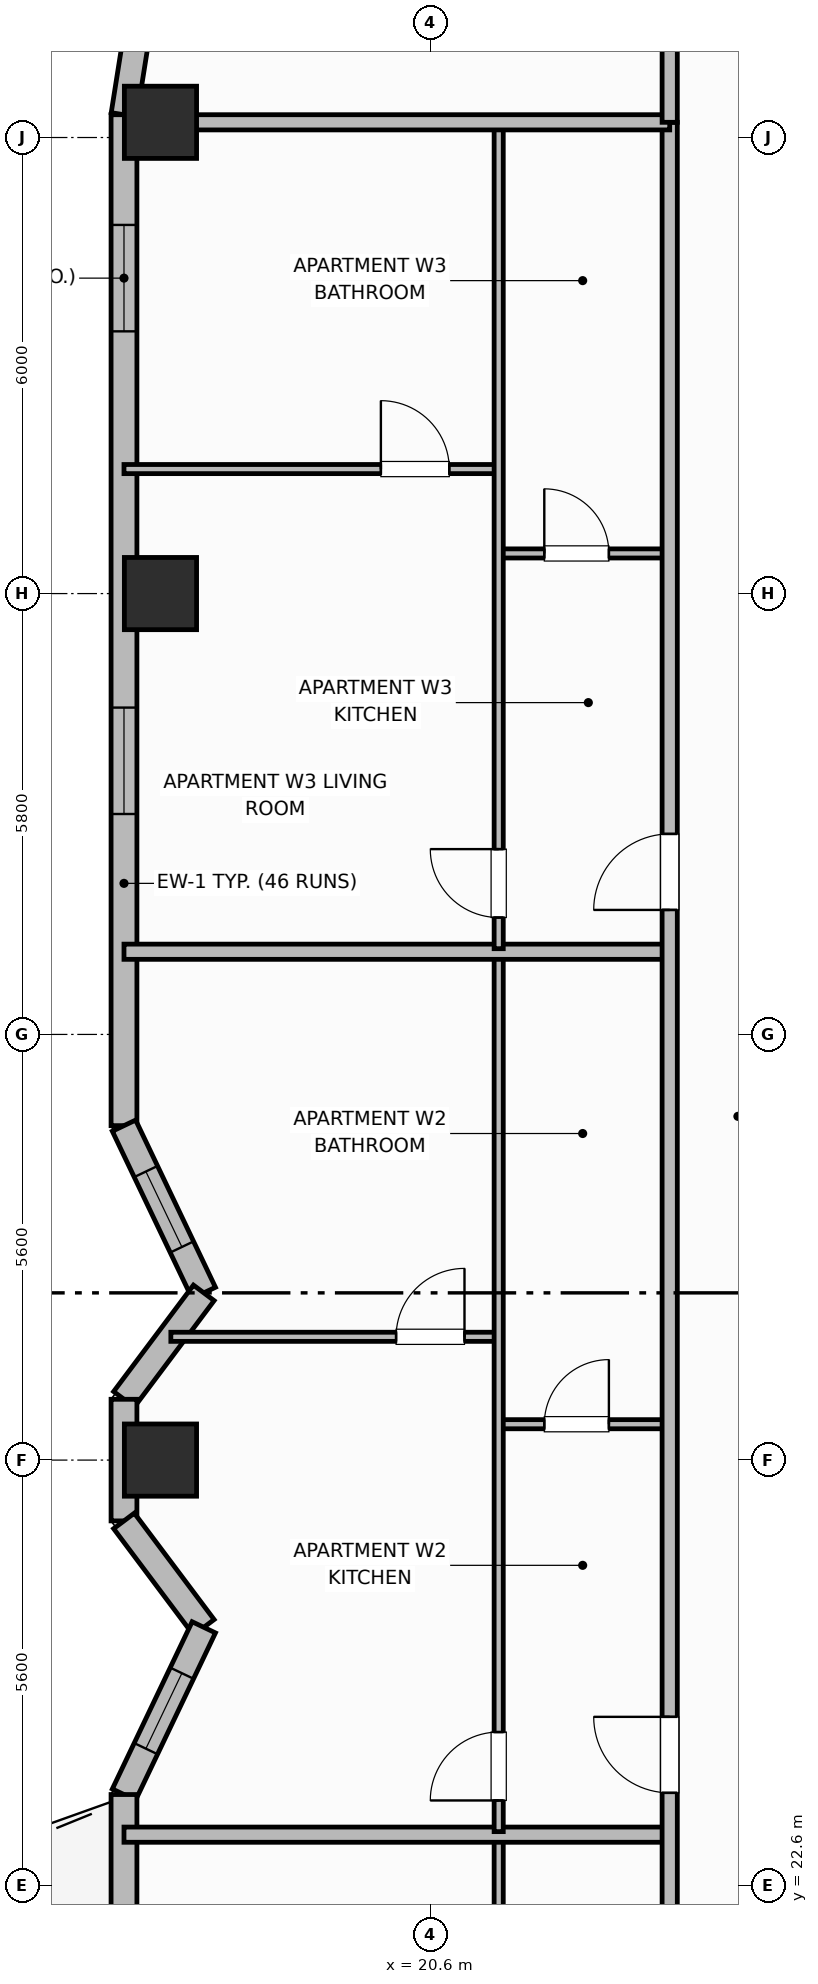
"""IFC4 building model, lengths in metres.
Left out: names, types, materials, properties, quantities, classifications, styles, units other than length and angle.
Written with IfcOpenShell. Run it as: python <this file> out.ifc"""

import sys

from ifc_helpers import new_model, si_unit, direction, frame, frame_2d, origin, origin_2d, place, context, subcontext, project, spatial, rectangle, extrude, element, fill, save


model = new_model("IFC4")
c1 = context("Model", 3, precision=1e-05, world=origin(), true_north=direction((0.0, 1.0)))
c2 = subcontext(c1, "Body", "Model", "MODEL_VIEW")
j1 = project(units=[si_unit("LENGTHUNIT", "METRE"), si_unit("PLANEANGLEUNIT", "RADIAN")], contexts=[c1])
p1 = place(None, origin())
s1 = spatial("IfcSite", under=j1, at=p1, CompositionType="ELEMENT")
p2 = place(p1, origin())
s2 = spatial("IfcBuilding", under=s1, at=p2, CompositionType="ELEMENT")
p3 = place(p2, frame((0.0, 0.0, 192.2)))
s3 = spatial("IfcBuildingStorey", under=s2, at=p3, CompositionType="ELEMENT", Elevation=192.2)
for number, where, z_axis, x_axis in (
    (1, (17.05, 28.2, 0.0), (0.0, 0.0, 1.0), (1.0, 0.0, 0.0)),
    (2, (17.05, 39.6, 0.0), (0.0, 0.0, 1.0), (1.0, 0.0, 0.0)),
    (3, (17.05, 45.8, 0.0), (0.0, 0.0, 1.0), (1.0, 0.0, 0.0)),
):
    element("IfcColumn", number, at=place(p3, frame(where, z_axis=z_axis, x_axis=x_axis)), inside=s3, PredefinedType="COLUMN", context=c2, shape_type="SweptSolid", body=[
        extrude(rectangle(XDim=0.95, YDim=0.95, at=origin_2d()), origin(), (0.0, 0.0, 1.0), 3.7),
    ])
p4 = place(p3, frame((16.748, 47.022, 0.0), z_axis=(0.0, 0.0, 1.0), x_axis=(-0.156481329164, -0.987680916907, 0.0)))
e4 = element("IfcWall", 4, at=p4, inside=s3, PredefinedType="SOLIDWALL", context=c2, shape_type="SweptSolid", body=[
    extrude(rectangle(XDim=1.136, YDim=0.34, at=frame_2d((0.568, 0.0))), origin(), (0.0, 0.0, 1.0), 2.66),
])
p5 = place(p3, frame((16.57, 45.9, 0.0), z_axis=(0.0, 0.0, 1.0), x_axis=(0.0, -1.0, 0.0)))
e5 = element("IfcWall", 5, at=p5, inside=s3, PredefinedType="SOLIDWALL", context=c2, shape_type="SweptSolid", body=[
    extrude(rectangle(XDim=13.3, YDim=0.34, at=frame_2d((6.65, 0.0))), origin(), (0.0, 0.0, 1.0), 2.66),
])
p6 = place(p5, frame((1.45, 0.0, 0.69)))
e6 = element("IfcOpeningElement", 6, at=p6, cuts=e5, PredefinedType="OPENING", context=c2, shape_type="SweptSolid", body=[
    extrude(rectangle(XDim=1.4, YDim=1.85, at=frame_2d((0.7, 0.925))), frame((0.0, 0.18, 0.0), z_axis=(0.0, -1.0, 0.0), x_axis=(1.0, 0.0, 0.0)), (0.0, 0.0, 1.0), 0.36),
])
p7 = place(p5, frame((7.8, 0.0, 0.69)))
e7 = element("IfcOpeningElement", 7, at=p7, cuts=e5, PredefinedType="OPENING", context=c2, shape_type="SweptSolid", body=[
    extrude(rectangle(XDim=1.4, YDim=1.85, at=frame_2d((0.7, 0.925))), frame((0.0, 0.18, 0.0), z_axis=(0.0, -1.0, 0.0), x_axis=(1.0, 0.0, 0.0)), (0.0, 0.0, 1.0), 0.36),
])
p8 = place(p3, frame((16.57, 32.6, 0.0), z_axis=(0.0, 0.0, 1.0), x_axis=(0.430714756408, -0.902488115496, 0.0)))
e8 = element("IfcWall", 8, at=p8, inside=s3, PredefinedType="SOLIDWALL", context=c2, shape_type="SweptSolid", body=[
    extrude(rectangle(XDim=2.438, YDim=0.34, at=frame_2d((1.219, 0.0))), origin(), (0.0, 0.0, 1.0), 2.66),
])
p9 = place(p8, frame((0.669, 0.0, 0.85)))
e9 = element("IfcOpeningElement", 9, at=p9, cuts=e8, PredefinedType="OPENING", context=c2, shape_type="SweptSolid", body=[
    extrude(rectangle(XDim=1.1, YDim=1.65, at=frame_2d((0.55, 0.825))), frame((0.0, 0.18, 0.0), z_axis=(0.0, -1.0, 0.0), x_axis=(1.0, 0.0, 0.0)), (0.0, 0.0, 1.0), 0.36),
])
p10 = place(p3, frame((17.62, 30.4, 0.0), z_axis=(0.0, 0.0, 1.0), x_axis=(-0.600044643168, -0.799966515677, 0.0)))
e10 = element("IfcWall", 10, at=p10, inside=s3, PredefinedType="SOLIDWALL", context=c2, shape_type="SweptSolid", body=[
    extrude(rectangle(XDim=1.75, YDim=0.34, at=frame_2d((0.875, 0.0))), origin(), (0.0, 0.0, 1.0), 2.66),
])
p11 = place(p3, frame((16.57, 29.0, 0.0), z_axis=(0.0, 0.0, 1.0), x_axis=(0.0, -1.0, 0.0)))
e11 = element("IfcWall", 11, at=p11, inside=s3, PredefinedType="SOLIDWALL", context=c2, shape_type="SweptSolid", body=[
    extrude(rectangle(XDim=1.6, YDim=0.34, at=frame_2d((0.8, 0.0))), origin(), (0.0, 0.0, 1.0), 2.66),
])
p12 = place(p3, frame((16.57, 27.4, 0.0), z_axis=(0.0, 0.0, 1.0), x_axis=(0.600044643168, -0.799966515677, 0.0)))
e12 = element("IfcWall", 12, at=p12, inside=s3, PredefinedType="SOLIDWALL", context=c2, shape_type="SweptSolid", body=[
    extrude(rectangle(XDim=1.75, YDim=0.34, at=frame_2d((0.875, 0.0))), origin(), (0.0, 0.0, 1.0), 2.66),
])
p13 = place(p3, frame((17.62, 26.0, 0.0), z_axis=(0.0, 0.0, 1.0), x_axis=(-0.430753686581, -0.902469534941, 0.0)))
e13 = element("IfcWall", 13, at=p13, inside=s3, PredefinedType="SOLIDWALL", context=c2, shape_type="SweptSolid", body=[
    extrude(rectangle(XDim=2.438, YDim=0.34, at=frame_2d((1.219, 0.0))), origin(), (0.0, 0.0, 1.0), 2.66),
])
p14 = place(p13, frame((0.669, 0.0, 0.85)))
e14 = element("IfcOpeningElement", 14, at=p14, cuts=e13, PredefinedType="OPENING", context=c2, shape_type="SweptSolid", body=[
    extrude(rectangle(XDim=1.1, YDim=1.65, at=frame_2d((0.55, 0.825))), frame((0.0, 0.18, 0.0), z_axis=(0.0, -1.0, 0.0), x_axis=(1.0, 0.0, 0.0)), (0.0, 0.0, 1.0), 0.36),
])
p15 = place(p3, frame((16.57, 23.8, 0.0), z_axis=(0.0, 0.0, 1.0), x_axis=(0.0, -1.0, 0.0)))
e15 = element("IfcWall", 15, at=p15, inside=s3, PredefinedType="SOLIDWALL", context=c2, shape_type="SweptSolid", body=[
    extrude(rectangle(XDim=13.3, YDim=0.34, at=frame_2d((6.65, 0.0))), origin(), (0.0, 0.0, 1.0), 2.66),
])
p16 = place(p15, frame((1.7, 0.0, 0.0)))
e16 = element("IfcOpeningElement", 16, at=p16, cuts=e15, PredefinedType="OPENING", context=c2, shape_type="SweptSolid", body=[
    extrude(rectangle(XDim=1.6, YDim=2.1, at=frame_2d((0.8, 1.05))), frame((0.0, 0.18, 0.0), z_axis=(0.0, -1.0, 0.0), x_axis=(1.0, 0.0, 0.0)), (0.0, 0.0, 1.0), 0.36),
])
p17 = place(p15, frame((3.9, 0.0, 0.89)))
e17 = element("IfcOpeningElement", 17, at=p17, cuts=e15, PredefinedType="OPENING", context=c2, shape_type="SweptSolid", body=[
    extrude(rectangle(XDim=1.1, YDim=1.65, at=frame_2d((0.55, 0.825))), frame((0.0, 0.18, 0.0), z_axis=(0.0, -1.0, 0.0), x_axis=(1.0, 0.0, 0.0)), (0.0, 0.0, 1.0), 0.36),
])
p18 = place(p15, frame((8.3, 0.0, 0.89)))
e18 = element("IfcOpeningElement", 18, at=p18, cuts=e15, PredefinedType="OPENING", context=c2, shape_type="SweptSolid", body=[
    extrude(rectangle(XDim=1.1, YDim=1.65, at=frame_2d((0.55, 0.825))), frame((0.0, 0.18, 0.0), z_axis=(0.0, -1.0, 0.0), x_axis=(1.0, 0.0, 0.0)), (0.0, 0.0, 1.0), 0.36),
])
p19 = place(p15, frame((10.6, 0.0, 0.89)))
e19 = element("IfcOpeningElement", 19, at=p19, cuts=e15, PredefinedType="OPENING", context=c2, shape_type="SweptSolid", body=[
    extrude(rectangle(XDim=1.1, YDim=1.65, at=frame_2d((0.55, 0.825))), frame((0.0, 0.18, 0.0), z_axis=(0.0, -1.0, 0.0), x_axis=(1.0, 0.0, 0.0)), (0.0, 0.0, 1.0), 0.36),
])
p20 = place(p3, frame((21.5, 10.64, 0.0), z_axis=(0.0, 0.0, 1.0), x_axis=(0.0, 1.0, 0.0)))
e20 = element("IfcWall", 20, at=p20, inside=s3, PredefinedType="PARTITIONING", context=c2, shape_type="SweptSolid", body=[
    extrude(rectangle(XDim=12.592, YDim=0.12, at=frame_2d((6.296, 0.0))), origin(), (0.0, 0.0, 1.0), 2.49),
])
p21 = place(p20, frame((0.41, 0.0, 0.0)))
e21 = element("IfcOpeningElement", 21, at=p21, cuts=e20, PredefinedType="OPENING", context=c2, shape_type="SweptSolid", body=[
    extrude(rectangle(XDim=0.9, YDim=2.1, at=frame_2d((0.45, 1.05))), frame((0.0, 0.07, 0.0), z_axis=(0.0, -1.0, 0.0), x_axis=(1.0, 0.0, 0.0)), (0.0, 0.0, 1.0), 0.14),
])
p22 = place(p20, frame((10.471, 0.0, 0.0)))
e22 = element("IfcOpeningElement", 22, at=p22, cuts=e20, PredefinedType="OPENING", context=c2, shape_type="SweptSolid", body=[
    extrude(rectangle(XDim=0.82, YDim=2.08, at=frame_2d((0.41, 1.04))), frame((0.0, 0.07, 0.0), z_axis=(0.0, -1.0, 0.0), x_axis=(1.0, 0.0, 0.0)), (0.0, 0.0, 1.0), 0.14),
])
p23 = place(p3, frame((16.57, 23.272, 0.0), z_axis=(0.0, 0.0, 1.0), x_axis=(1.0, 0.0, 0.0)))
e23 = element("IfcWall", 23, at=p23, inside=s3, PredefinedType="PARTITIONING", context=c2, shape_type="SweptSolid", body=[
    extrude(rectangle(XDim=7.18, YDim=0.2, at=frame_2d((3.59, 0.0))), origin(), (0.0, 0.0, 1.0), 2.49),
])
p24 = place(p3, frame((21.5, 28.672, 0.0), z_axis=(0.0, 0.0, 1.0), x_axis=(1.0, 0.0, 0.0)))
e24 = element("IfcWall", 24, at=p24, inside=s3, PredefinedType="PARTITIONING", context=c2, shape_type="SweptSolid", body=[
    extrude(rectangle(XDim=2.25, YDim=0.12, at=frame_2d((1.125, 0.0))), origin(), (0.0, 0.0, 1.0), 2.49),
])
p25 = place(p24, frame((0.6, 0.0, 0.0)))
e25 = element("IfcOpeningElement", 25, at=p25, cuts=e24, PredefinedType="OPENING", context=c2, shape_type="SweptSolid", body=[
    extrude(rectangle(XDim=0.85, YDim=2.1, at=frame_2d((0.425, 1.05))), frame((0.0, 0.07, 0.0), z_axis=(0.0, -1.0, 0.0), x_axis=(1.0, 0.0, 0.0)), (0.0, 0.0, 1.0), 0.14),
])
p26 = place(p3, frame((17.187, 29.822, 0.0), z_axis=(0.0, 0.0, 1.0), x_axis=(1.0, 0.0, 0.0)))
e26 = element("IfcWall", 26, at=p26, inside=s3, PredefinedType="PARTITIONING", context=c2, shape_type="SweptSolid", body=[
    extrude(rectangle(XDim=4.313, YDim=0.12, at=frame_2d((2.157, 0.0))), origin(), (0.0, 0.0, 1.0), 2.49),
])
p27 = place(p26, frame((2.963, 0.0, 0.0)))
e27 = element("IfcOpeningElement", 27, at=p27, cuts=e26, PredefinedType="OPENING", context=c2, shape_type="SweptSolid", body=[
    extrude(rectangle(XDim=0.9, YDim=2.1, at=frame_2d((0.45, 1.05))), frame((0.0, 0.07, 0.0), z_axis=(0.0, -1.0, 0.0), x_axis=(1.0, 0.0, 0.0)), (0.0, 0.0, 1.0), 0.14),
])
p28 = place(p3, frame((21.5, 23.312, 0.0), z_axis=(0.0, 0.0, 1.0), x_axis=(0.0, 1.0, 0.0)))
e28 = element("IfcWall", 28, at=p28, inside=s3, PredefinedType="PARTITIONING", context=c2, shape_type="SweptSolid", body=[
    extrude(rectangle(XDim=11.536, YDim=0.12, at=frame_2d((5.768, 0.0))), origin(), (0.0, 0.0, 1.0), 2.49),
])
p29 = place(p28, frame((0.41, 0.0, 0.0)))
e29 = element("IfcOpeningElement", 29, at=p29, cuts=e28, PredefinedType="OPENING", context=c2, shape_type="SweptSolid", body=[
    extrude(rectangle(XDim=0.9, YDim=2.1, at=frame_2d((0.45, 1.05))), frame((0.0, 0.07, 0.0), z_axis=(0.0, -1.0, 0.0), x_axis=(1.0, 0.0, 0.0)), (0.0, 0.0, 1.0), 0.14),
])
p30 = place(p3, frame((16.57, 34.888, 0.0), z_axis=(0.0, 0.0, 1.0), x_axis=(1.0, 0.0, 0.0)))
e30 = element("IfcWall", 30, at=p30, inside=s3, PredefinedType="PARTITIONING", context=c2, shape_type="SweptSolid", body=[
    extrude(rectangle(XDim=7.18, YDim=0.2, at=frame_2d((3.59, 0.0))), origin(), (0.0, 0.0, 1.0), 2.49),
])
p31 = place(p3, frame((21.5, 40.128, 0.0), z_axis=(0.0, 0.0, 1.0), x_axis=(1.0, 0.0, 0.0)))
e31 = element("IfcWall", 31, at=p31, inside=s3, PredefinedType="PARTITIONING", context=c2, shape_type="SweptSolid", body=[
    extrude(rectangle(XDim=2.25, YDim=0.12, at=frame_2d((1.125, 0.0))), origin(), (0.0, 0.0, 1.0), 2.49),
])
p32 = place(p31, frame((0.6, 0.0, 0.0)))
e32 = element("IfcOpeningElement", 32, at=p32, cuts=e31, PredefinedType="OPENING", context=c2, shape_type="SweptSolid", body=[
    extrude(rectangle(XDim=0.85, YDim=2.1, at=frame_2d((0.425, 1.05))), frame((0.0, 0.07, 0.0), z_axis=(0.0, -1.0, 0.0), x_axis=(1.0, 0.0, 0.0)), (0.0, 0.0, 1.0), 0.14),
])
p33 = place(p3, frame((16.57, 41.238, 0.0), z_axis=(0.0, 0.0, 1.0), x_axis=(1.0, 0.0, 0.0)))
e33 = element("IfcWall", 33, at=p33, inside=s3, PredefinedType="PARTITIONING", context=c2, shape_type="SweptSolid", body=[
    extrude(rectangle(XDim=4.93, YDim=0.12, at=frame_2d((2.465, 0.0))), origin(), (0.0, 0.0, 1.0), 2.49),
])
p34 = place(p33, frame((3.38, 0.0, 0.0)))
e34 = element("IfcOpeningElement", 34, at=p34, cuts=e33, PredefinedType="OPENING", context=c2, shape_type="SweptSolid", body=[
    extrude(rectangle(XDim=0.9, YDim=2.1, at=frame_2d((0.45, 1.05))), frame((0.0, 0.07, 0.0), z_axis=(0.0, -1.0, 0.0), x_axis=(1.0, 0.0, 0.0)), (0.0, 0.0, 1.0), 0.14),
])
p35 = place(p3, frame((21.5, 34.928, 0.0), z_axis=(0.0, 0.0, 1.0), x_axis=(0.0, 1.0, 0.0)))
e35 = element("IfcWall", 35, at=p35, inside=s3, PredefinedType="PARTITIONING", context=c2, shape_type="SweptSolid", body=[
    extrude(rectangle(XDim=10.832, YDim=0.12, at=frame_2d((5.416, 0.0))), origin(), (0.0, 0.0, 1.0), 2.49),
])
p36 = place(p35, frame((0.41, 0.0, 0.0)))
e36 = element("IfcOpeningElement", 36, at=p36, cuts=e35, PredefinedType="OPENING", context=c2, shape_type="SweptSolid", body=[
    extrude(rectangle(XDim=0.9, YDim=2.1, at=frame_2d((0.45, 1.05))), frame((0.0, 0.07, 0.0), z_axis=(0.0, -1.0, 0.0), x_axis=(1.0, 0.0, 0.0)), (0.0, 0.0, 1.0), 0.14),
])
p37 = place(p3, frame((23.75, 10.6, 0.0), z_axis=(0.0, 0.0, 1.0), x_axis=(0.0, 1.0, 0.0)))
e37 = element("IfcWall", 37, at=p37, inside=s3, PredefinedType="PARTITIONING", context=c2, shape_type="SweptSolid", body=[
    extrude(rectangle(XDim=35.2, YDim=0.2, at=frame_2d((17.6, 0.0))), origin(), (0.0, 0.0, 1.0), 2.49),
])
p38 = place(p37, frame((2.65, 0.0, 0.0)))
e38 = element("IfcOpeningElement", 38, at=p38, cuts=e37, PredefinedType="OPENING", context=c2, shape_type="SweptSolid", body=[
    extrude(rectangle(XDim=1.0, YDim=2.15, at=frame_2d((0.5, 1.075))), frame((0.0, 0.11, 0.0), z_axis=(0.0, -1.0, 0.0), x_axis=(1.0, 0.0, 0.0)), (0.0, 0.0, 1.0), 0.22),
])
p39 = place(p37, frame((13.222, 0.0, 0.0)))
e39 = element("IfcOpeningElement", 39, at=p39, cuts=e37, PredefinedType="OPENING", context=c2, shape_type="SweptSolid", body=[
    extrude(rectangle(XDim=1.0, YDim=2.15, at=frame_2d((0.5, 1.075))), frame((0.0, 0.11, 0.0), z_axis=(0.0, -1.0, 0.0), x_axis=(1.0, 0.0, 0.0)), (0.0, 0.0, 1.0), 0.22),
])
p40 = place(p37, frame((24.838, 0.0, 0.0)))
e40 = element("IfcOpeningElement", 40, at=p40, cuts=e37, PredefinedType="OPENING", context=c2, shape_type="SweptSolid", body=[
    extrude(rectangle(XDim=1.0, YDim=2.15, at=frame_2d((0.5, 1.075))), frame((0.0, 0.11, 0.0), z_axis=(0.0, -1.0, 0.0), x_axis=(1.0, 0.0, 0.0)), (0.0, 0.0, 1.0), 0.22),
])
p41 = place(p3, frame((16.99, 45.8, 0.0), z_axis=(0.0, 0.0, 1.0), x_axis=(1.0, 0.0, 0.0)))
e41 = element("IfcWall", 41, at=p41, inside=s3, PredefinedType="PARTITIONING", context=c2, shape_type="SweptSolid", body=[
    extrude(rectangle(XDim=6.76, YDim=0.2, at=frame_2d((3.38, 0.0))), origin(), (0.0, 0.0, 1.0), 2.49),
])
p42 = place(p3, frame((23.75, 45.8, 0.0), z_axis=(0.0, 0.0, 1.0), x_axis=(0.0, 1.0, 0.0)))
e42 = element("IfcWall", 42, at=p42, inside=s3, PredefinedType="PARTITIONING", context=c2, shape_type="SweptSolid", body=[
    extrude(rectangle(XDim=3.73, YDim=0.2, at=frame_2d((1.865, 0.0))), origin(), (0.0, 0.0, 1.0), 2.49),
])
p43 = place(p6, origin())
e43 = element("IfcWindow", 43, at=p43, inside=s3, PartitioningType="SINGLE_PANEL", PredefinedType="WINDOW", context=c2, shape_type="SweptSolid", body=[
    extrude(rectangle(XDim=1.4, YDim=1.85, at=frame_2d((0.7, 0.925))), frame((0.0, 0.03, 0.0), z_axis=(0.0, -1.0, 0.0), x_axis=(1.0, 0.0, 0.0)), (0.0, 0.0, 1.0), 0.06),
])
fill(e6, e43)
p44 = place(p7, origin())
e44 = element("IfcWindow", 44, at=p44, inside=s3, PartitioningType="SINGLE_PANEL", PredefinedType="WINDOW", context=c2, shape_type="SweptSolid", body=[
    extrude(rectangle(XDim=1.4, YDim=1.85, at=frame_2d((0.7, 0.925))), frame((0.0, 0.03, 0.0), z_axis=(0.0, -1.0, 0.0), x_axis=(1.0, 0.0, 0.0)), (0.0, 0.0, 1.0), 0.06),
])
fill(e7, e44)
p45 = place(p9, origin())
e45 = element("IfcWindow", 45, at=p45, inside=s3, PartitioningType="SINGLE_PANEL", PredefinedType="WINDOW", context=c2, shape_type="SweptSolid", body=[
    extrude(rectangle(XDim=1.1, YDim=1.65, at=frame_2d((0.55, 0.825))), frame((0.0, 0.03, 0.0), z_axis=(0.0, -1.0, 0.0), x_axis=(1.0, 0.0, 0.0)), (0.0, 0.0, 1.0), 0.06),
])
fill(e9, e45)
p46 = place(p14, origin())
e46 = element("IfcWindow", 46, at=p46, inside=s3, PartitioningType="SINGLE_PANEL", PredefinedType="WINDOW", context=c2, shape_type="SweptSolid", body=[
    extrude(rectangle(XDim=1.1, YDim=1.65, at=frame_2d((0.55, 0.825))), frame((0.0, 0.03, 0.0), z_axis=(0.0, -1.0, 0.0), x_axis=(1.0, 0.0, 0.0)), (0.0, 0.0, 1.0), 0.06),
])
fill(e14, e46)
p47 = place(p25, origin())
e47 = element("IfcDoor", 47, at=p47, inside=s3, OperationType="SINGLE_SWING_RIGHT", PredefinedType="DOOR", context=c2, shape_type="SweptSolid", body=[
    extrude(rectangle(XDim=0.85, YDim=2.1, at=frame_2d((0.425, 1.05))), frame((0.0, 0.025, 0.0), z_axis=(0.0, -1.0, 0.0), x_axis=(1.0, 0.0, 0.0)), (0.0, 0.0, 1.0), 0.05),
])
fill(e25, e47)
p48 = place(p27, origin())
e48 = element("IfcDoor", 48, at=p48, inside=s3, OperationType="SINGLE_SWING_RIGHT", PredefinedType="DOOR", context=c2, shape_type="SweptSolid", body=[
    extrude(rectangle(XDim=0.9, YDim=2.1, at=frame_2d((0.45, 1.05))), frame((0.0, 0.025, 0.0), z_axis=(0.0, -1.0, 0.0), x_axis=(1.0, 0.0, 0.0)), (0.0, 0.0, 1.0), 0.05),
])
fill(e27, e48)
p49 = place(p29, origin())
e49 = element("IfcDoor", 49, at=p49, inside=s3, OperationType="SINGLE_SWING_LEFT", PredefinedType="DOOR", context=c2, shape_type="SweptSolid", body=[
    extrude(rectangle(XDim=0.9, YDim=2.1, at=frame_2d((0.45, 1.05))), frame((0.0, 0.025, 0.0), z_axis=(0.0, -1.0, 0.0), x_axis=(1.0, 0.0, 0.0)), (0.0, 0.0, 1.0), 0.05),
])
fill(e29, e49)
p50 = place(p32, origin())
e50 = element("IfcDoor", 50, at=p50, inside=s3, OperationType="SINGLE_SWING_LEFT", PredefinedType="DOOR", context=c2, shape_type="SweptSolid", body=[
    extrude(rectangle(XDim=0.85, YDim=2.1, at=frame_2d((0.425, 1.05))), frame((0.0, 0.025, 0.0), z_axis=(0.0, -1.0, 0.0), x_axis=(1.0, 0.0, 0.0)), (0.0, 0.0, 1.0), 0.05),
])
fill(e32, e50)
p51 = place(p34, origin())
e51 = element("IfcDoor", 51, at=p51, inside=s3, OperationType="SINGLE_SWING_LEFT", PredefinedType="DOOR", context=c2, shape_type="SweptSolid", body=[
    extrude(rectangle(XDim=0.9, YDim=2.1, at=frame_2d((0.45, 1.05))), frame((0.0, 0.025, 0.0), z_axis=(0.0, -1.0, 0.0), x_axis=(1.0, 0.0, 0.0)), (0.0, 0.0, 1.0), 0.05),
])
fill(e34, e51)
p52 = place(p36, origin())
e52 = element("IfcDoor", 52, at=p52, inside=s3, OperationType="SINGLE_SWING_RIGHT", PredefinedType="DOOR", context=c2, shape_type="SweptSolid", body=[
    extrude(rectangle(XDim=0.9, YDim=2.1, at=frame_2d((0.45, 1.05))), frame((0.0, 0.025, 0.0), z_axis=(0.0, -1.0, 0.0), x_axis=(1.0, 0.0, 0.0)), (0.0, 0.0, 1.0), 0.05),
])
fill(e36, e52)
p53 = place(p39, origin())
e53 = element("IfcDoor", 53, at=p53, inside=s3, OperationType="SINGLE_SWING_RIGHT", PredefinedType="DOOR", context=c2, shape_type="SweptSolid", body=[
    extrude(rectangle(XDim=1.0, YDim=2.15, at=frame_2d((0.5, 1.075))), frame((0.0, 0.025, 0.0), z_axis=(0.0, -1.0, 0.0), x_axis=(1.0, 0.0, 0.0)), (0.0, 0.0, 1.0), 0.05),
])
fill(e39, e53)
p54 = place(p40, origin())
e54 = element("IfcDoor", 54, at=p54, inside=s3, OperationType="SINGLE_SWING_LEFT", PredefinedType="DOOR", context=c2, shape_type="SweptSolid", body=[
    extrude(rectangle(XDim=1.0, YDim=2.15, at=frame_2d((0.5, 1.075))), frame((0.0, 0.025, 0.0), z_axis=(0.0, -1.0, 0.0), x_axis=(1.0, 0.0, 0.0)), (0.0, 0.0, 1.0), 0.05),
])
fill(e40, e54)
save(model, sys.argv[1])
